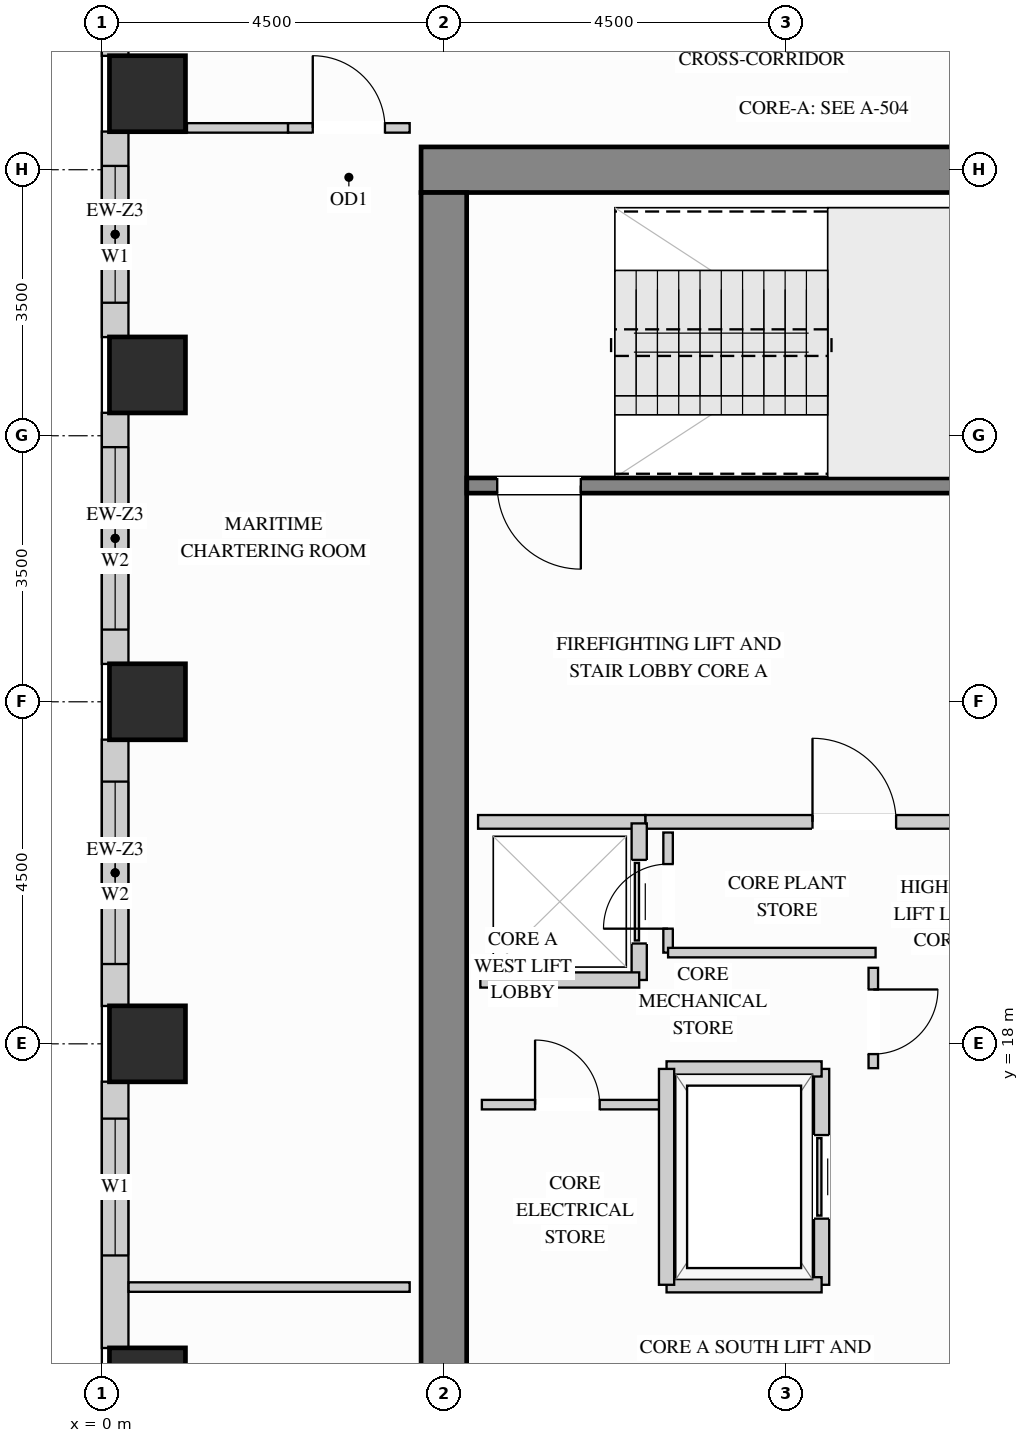
"""IFC4 building model, lengths in metres.
Left out: names, types, materials, properties, quantities, classifications, styles, units other than length and angle.
Written with IfcOpenShell. Run it as: python <this file> out.ifc"""

import sys

from ifc_helpers import new_model, si_unit, direction, frame, frame_2d, origin, origin_2d, place, context, subcontext, project, spatial, rectangle, extrude, source, transform, mapped, element, fill, save


model = new_model("IFC4")
c1 = context("Model", 3, precision=1e-05, world=origin(), true_north=direction((0.0, 1.0)))
c2 = subcontext(c1, "Body", "Model", "MODEL_VIEW")
j1 = project(units=[si_unit("LENGTHUNIT", "METRE"), si_unit("PLANEANGLEUNIT", "RADIAN")], contexts=[c1])
p1 = place(None, origin())
s1 = spatial("IfcSite", under=j1, at=p1, CompositionType="ELEMENT")
p2 = place(p1, origin())
s2 = spatial("IfcBuilding", under=s1, at=p2, CompositionType="ELEMENT")
p3 = place(p2, frame((0.0, 0.0, 164.7)))
s3 = spatial("IfcBuildingStorey", under=s2, at=p3, CompositionType="ELEMENT", Elevation=164.7)
m1 = source(origin(), c2, "Body", "SweptSolid", [
    extrude(rectangle(XDim=1.0, YDim=1.0, at=origin_2d()), origin(), (0.0, 0.0, 1.0), 3.4),
])
for number, where, z_axis, x_axis in (
    (1, (0.6, 13.5, 0.0), (0.0, 0.0, 1.0), (1.0, 0.0, 0.0)),
    (2, (0.6, 18.0, 0.0), (0.0, 0.0, 1.0), (1.0, 0.0, 0.0)),
    (3, (0.6, 22.5, 0.0), (0.0, 0.0, 1.0), (1.0, 0.0, 0.0)),
    (4, (0.6, 26.8, 0.0), (0.0, 0.0, 1.0), (1.0, 0.0, 0.0)),
    (5, (0.6, 30.5, 0.0), (0.0, 0.0, 1.0), (1.0, 0.0, 0.0)),
):
    element("IfcColumn", number, at=place(p3, frame(where, z_axis=z_axis, x_axis=x_axis)), inside=s3, PredefinedType="COLUMN", context=c2, shape_type="MappedRepresentation", body=[
        mapped(m1, transform((0.0, 0.0, 0.0), x_axis=(1.0, 0.0, 0.0), y_axis=(0.0, 1.0, 0.0), z_axis=(0.0, 0.0, 1.0))),
    ])
m2 = source(origin(), c2, "Body", "SweptSolid", [
    extrude(rectangle(XDim=10.6, YDim=0.6, at=frame_2d((5.3, 0.0))), origin(), (0.0, 0.0, 1.0), 3.4),
])
p4 = place(p3, frame((4.2, 29.5, 0.0), z_axis=(0.0, 0.0, 1.0), x_axis=(1.0, 0.0, 0.0)))
e6 = element("IfcWall", 6, at=p4, inside=s3, PredefinedType="SHEAR", context=c2, shape_type="MappedRepresentation", body=[
    mapped(m2, transform((0.0, 0.0, 0.0), x_axis=(1.0, 0.0, 0.0), y_axis=(0.0, 1.0, 0.0), z_axis=(0.0, 0.0, 1.0))),
])
m3 = source(origin(), c2, "Body", "SweptSolid", [
    extrude(rectangle(XDim=20.4, YDim=0.6, at=frame_2d((10.2, 0.0))), origin(), (0.0, 0.0, 1.0), 3.4),
])
p5 = place(p3, frame((4.5, 8.8, 0.0), z_axis=(0.0, 0.0, 1.0), x_axis=(0.0, 1.0, 0.0)))
e7 = element("IfcWall", 7, at=p5, inside=s3, PredefinedType="SHEAR", context=c2, shape_type="MappedRepresentation", body=[
    mapped(m3, transform((0.0, 0.0, 0.0), x_axis=(1.0, 0.0, 0.0), y_axis=(0.0, 1.0, 0.0), z_axis=(0.0, 0.0, 1.0))),
])
p6 = place(p3, frame((0.175, 34.502, 0.0), z_axis=(0.0, 0.0, 1.0), x_axis=(0.0, -1.0, 0.0)))
e8 = element("IfcWall", 8, at=p6, inside=s3, PredefinedType="SOLIDWALL", context=c2, shape_type="SweptSolid", body=[
    extrude(rectangle(XDim=3.504, YDim=0.35, at=frame_2d((1.752, 0.0))), origin(), (0.0, 0.0, 1.0), 2.612),
])
p7 = place(p6, frame((0.611, 0.0, 0.78)))
e9 = element("IfcOpeningElement", 9, at=p7, cuts=e8, PredefinedType="OPENING", context=c2, shape_type="SweptSolid", body=[
    extrude(rectangle(XDim=1.2, YDim=1.652, at=frame_2d((0.6, 0.826))), frame((0.0, 0.185, 0.0), z_axis=(0.0, -1.0, 0.0), x_axis=(1.0, 0.0, 0.0)), (0.0, 0.0, 1.0), 0.37),
])
p8 = place(p3, frame((0.175, 30.002, 0.0), z_axis=(0.0, 0.0, 1.0), x_axis=(0.0, -1.0, 0.0)))
e10 = element("IfcWall", 10, at=p8, inside=s3, PredefinedType="SOLIDWALL", context=c2, shape_type="SweptSolid", body=[
    extrude(rectangle(XDim=2.704, YDim=0.35, at=frame_2d((1.352, 0.0))), origin(), (0.0, 0.0, 1.0), 2.612),
])
p9 = place(p8, frame((0.452, 0.0, 0.78)))
e11 = element("IfcOpeningElement", 11, at=p9, cuts=e10, PredefinedType="OPENING", context=c2, shape_type="SweptSolid", body=[
    extrude(rectangle(XDim=1.8, YDim=1.652, at=frame_2d((0.9, 0.826))), frame((0.0, 0.185, 0.0), z_axis=(0.0, -1.0, 0.0), x_axis=(1.0, 0.0, 0.0)), (0.0, 0.0, 1.0), 0.37),
])
p10 = place(p3, frame((0.175, 26.302, 0.0), z_axis=(0.0, 0.0, 1.0), x_axis=(0.0, -1.0, 0.0)))
e12 = element("IfcWall", 12, at=p10, inside=s3, PredefinedType="SOLIDWALL", context=c2, shape_type="SweptSolid", body=[
    extrude(rectangle(XDim=3.304, YDim=0.35, at=frame_2d((1.652, 0.0))), origin(), (0.0, 0.0, 1.0), 2.612),
])
p11 = place(p10, frame((0.452, 0.0, 0.78)))
e13 = element("IfcOpeningElement", 13, at=p11, cuts=e12, PredefinedType="OPENING", context=c2, shape_type="SweptSolid", body=[
    extrude(rectangle(XDim=2.4, YDim=1.652, at=frame_2d((1.2, 0.826))), frame((0.0, 0.185, 0.0), z_axis=(0.0, -1.0, 0.0), x_axis=(1.0, 0.0, 0.0)), (0.0, 0.0, 1.0), 0.37),
])
p12 = place(p3, frame((0.175, 22.002, 0.0), z_axis=(0.0, 0.0, 1.0), x_axis=(0.0, -1.0, 0.0)))
e14 = element("IfcWall", 14, at=p12, inside=s3, PredefinedType="SOLIDWALL", context=c2, shape_type="SweptSolid", body=[
    extrude(rectangle(XDim=3.504, YDim=0.35, at=frame_2d((1.752, 0.0))), origin(), (0.0, 0.0, 1.0), 2.612),
])
p13 = place(p12, frame((0.552, 0.0, 0.78)))
e15 = element("IfcOpeningElement", 15, at=p13, cuts=e14, PredefinedType="OPENING", context=c2, shape_type="SweptSolid", body=[
    extrude(rectangle(XDim=2.4, YDim=1.652, at=frame_2d((1.2, 0.826))), frame((0.0, 0.185, 0.0), z_axis=(0.0, -1.0, 0.0), x_axis=(1.0, 0.0, 0.0)), (0.0, 0.0, 1.0), 0.37),
])
p14 = place(p3, frame((0.175, 17.502, 0.0), z_axis=(0.0, 0.0, 1.0), x_axis=(0.0, -1.0, 0.0)))
e16 = element("IfcWall", 16, at=p14, inside=s3, PredefinedType="SOLIDWALL", context=c2, shape_type="SweptSolid", body=[
    extrude(rectangle(XDim=3.504, YDim=0.35, at=frame_2d((1.752, 0.0))), origin(), (0.0, 0.0, 1.0), 2.612),
])
p15 = place(p14, frame((0.486, 0.0, 0.78)))
e17 = element("IfcOpeningElement", 17, at=p15, cuts=e16, PredefinedType="OPENING", context=c2, shape_type="SweptSolid", body=[
    extrude(rectangle(XDim=1.8, YDim=1.652, at=frame_2d((0.9, 0.826))), frame((0.0, 0.185, 0.0), z_axis=(0.0, -1.0, 0.0), x_axis=(1.0, 0.0, 0.0)), (0.0, 0.0, 1.0), 0.37),
])
p16 = place(p3, frame((7.15, 20.92, 0.0), z_axis=(0.0, 0.0, 1.0), x_axis=(1.0, 0.0, 0.0)))
e18 = element("IfcWall", 18, at=p16, inside=s3, PredefinedType="PARTITIONING", context=c2, shape_type="SweptSolid", body=[
    extrude(rectangle(XDim=4.68, YDim=0.18, at=frame_2d((2.34, 0.0))), origin(), (0.0, 0.0, 1.0), 3.385),
])
p17 = place(p16, frame((2.2, 0.0, 0.0)))
e19 = element("IfcOpeningElement", 19, at=p17, cuts=e18, PredefinedType="OPENING", context=c2, shape_type="SweptSolid", body=[
    extrude(rectangle(XDim=1.1, YDim=2.15, at=frame_2d((0.55, 1.075))), frame((0.0, 0.1, 0.0), z_axis=(0.0, -1.0, 0.0), x_axis=(1.0, 0.0, 0.0)), (0.0, 0.0, 1.0), 0.2),
])
m4 = source(origin(), c2, "Body", "SweptSolid", [
    extrude(rectangle(XDim=2.2, YDim=0.18, at=frame_2d((1.1, 0.0))), origin(), (0.0, 0.0, 1.0), 3.385),
])
p18 = place(p3, frame((4.95, 20.92, 0.0), z_axis=(0.0, 0.0, 1.0), x_axis=(1.0, 0.0, 0.0)))
e20 = element("IfcWall", 20, at=p18, inside=s3, PredefinedType="PARTITIONING", context=c2, shape_type="MappedRepresentation", body=[
    mapped(m4, transform((0.0, 0.0, 0.0), x_axis=(1.0, 0.0, 0.0), y_axis=(0.0, 1.0, 0.0), z_axis=(0.0, 0.0, 1.0))),
])
p19 = place(p3, frame((10.15, 17.68, 0.0), z_axis=(0.0, 0.0, 1.0), x_axis=(0.0, 1.0, 0.0)))
e21 = element("IfcWall", 21, at=p19, inside=s3, PredefinedType="PARTITIONING", context=c2, shape_type="SweptSolid", body=[
    extrude(rectangle(XDim=1.32, YDim=0.125, at=frame_2d((0.66, 0.0))), origin(), (0.0, 0.0, 1.0), 3.385),
])
p20 = place(p19, frame((0.185, 0.0, 0.0)))
e22 = element("IfcOpeningElement", 22, at=p20, cuts=e21, PredefinedType="OPENING", context=c2, shape_type="SweptSolid", body=[
    extrude(rectangle(XDim=0.85, YDim=2.1, at=frame_2d((0.425, 1.05))), frame((0.0, 0.073, 0.0), z_axis=(0.0, -1.0, 0.0), x_axis=(1.0, 0.0, 0.0)), (0.0, 0.0, 1.0), 0.145),
])
p21 = place(p3, frame((7.45, 19.2, 0.0), z_axis=(0.0, 0.0, 1.0), x_axis=(0.0, 1.0, 0.0)))
e23 = element("IfcWall", 23, at=p21, inside=s3, PredefinedType="PARTITIONING", context=c2, shape_type="SweptSolid", body=[
    extrude(rectangle(XDim=1.58, YDim=0.125, at=frame_2d((0.79, 0.0))), origin(), (0.0, 0.0, 1.0), 3.385),
])
p22 = place(p21, frame((0.315, 0.0, 0.0)))
e24 = element("IfcOpeningElement", 24, at=p22, cuts=e23, PredefinedType="OPENING", context=c2, shape_type="SweptSolid", body=[
    extrude(rectangle(XDim=0.85, YDim=2.1, at=frame_2d((0.425, 1.05))), frame((0.0, 0.073, 0.0), z_axis=(0.0, -1.0, 0.0), x_axis=(1.0, 0.0, 0.0)), (0.0, 0.0, 1.0), 0.145),
])
m5 = source(origin(), c2, "Body", "SweptSolid", [
    extrude(rectangle(XDim=2.73, YDim=0.125, at=frame_2d((1.365, 0.0))), origin(), (0.0, 0.0, 1.0), 3.385),
])
p23 = place(p3, frame((7.45, 19.2, 0.0), z_axis=(0.0, 0.0, 1.0), x_axis=(1.0, 0.0, 0.0)))
e25 = element("IfcWall", 25, at=p23, inside=s3, PredefinedType="PARTITIONING", context=c2, shape_type="MappedRepresentation", body=[
    mapped(m5, transform((0.0, 0.0, 0.0), x_axis=(1.0, 0.0, 0.0), y_axis=(0.0, 1.0, 0.0), z_axis=(0.0, 0.0, 1.0))),
])
p24 = place(p3, frame((5.0, 17.2, 0.0), z_axis=(0.0, 0.0, 1.0), x_axis=(1.0, 0.0, 0.0)))
e26 = element("IfcWall", 26, at=p24, inside=s3, PredefinedType="PARTITIONING", context=c2, shape_type="SweptSolid", body=[
    extrude(rectangle(XDim=2.4, YDim=0.125, at=frame_2d((1.2, 0.0))), origin(), (0.0, 0.0, 1.0), 3.385),
])
p25 = place(p24, frame((0.7, 0.0, 0.0)))
e27 = element("IfcOpeningElement", 27, at=p25, cuts=e26, PredefinedType="OPENING", context=c2, shape_type="SweptSolid", body=[
    extrude(rectangle(XDim=0.85, YDim=2.1, at=frame_2d((0.425, 1.05))), frame((0.0, 0.073, 0.0), z_axis=(0.0, -1.0, 0.0), x_axis=(1.0, 0.0, 0.0)), (0.0, 0.0, 1.0), 0.145),
])
m6 = source(origin(), c2, "Body", "SweptSolid", [
    extrude(rectangle(XDim=1.33, YDim=0.125, at=frame_2d((0.665, 0.0))), origin(), (0.0, 0.0, 1.0), 3.385),
])
p26 = place(p3, frame((1.12, 30.05, 0.0), z_axis=(0.0, 0.0, 1.0), x_axis=(1.0, 0.0, 0.0)))
e28 = element("IfcWall", 28, at=p26, inside=s3, PredefinedType="PARTITIONING", context=c2, shape_type="MappedRepresentation", body=[
    mapped(m6, transform((0.0, 0.0, 0.0), x_axis=(1.0, 0.0, 0.0), y_axis=(0.0, 1.0, 0.0), z_axis=(0.0, 0.0, 1.0))),
])
p27 = place(p3, frame((2.45, 30.05, 0.0), z_axis=(0.0, 0.0, 1.0), x_axis=(1.0, 0.0, 0.0)))
e29 = element("IfcWall", 29, at=p27, inside=s3, PredefinedType="PARTITIONING", context=c2, shape_type="SweptSolid", body=[
    extrude(rectangle(XDim=1.6, YDim=0.125, at=frame_2d((0.8, 0.0))), origin(), (0.0, 0.0, 1.0), 3.385),
])
p28 = place(p27, frame((0.325, 0.0, 0.0)))
e30 = element("IfcOpeningElement", 30, at=p28, cuts=e29, PredefinedType="OPENING", context=c2, shape_type="SweptSolid", body=[
    extrude(rectangle(XDim=0.95, YDim=2.15, at=frame_2d((0.475, 1.075))), frame((0.0, 0.073, 0.0), z_axis=(0.0, -1.0, 0.0), x_axis=(1.0, 0.0, 0.0)), (0.0, 0.0, 1.0), 0.145),
])
m7 = source(origin(), c2, "Body", "SweptSolid", [
    extrude(rectangle(XDim=3.698, YDim=0.125, at=frame_2d((1.849, 0.0))), origin(), (0.0, 0.0, 1.0), 3.385),
])
p29 = place(p3, frame((0.352, 14.8, 0.0), z_axis=(0.0, 0.0, 1.0), x_axis=(1.0, 0.0, 0.0)))
e31 = element("IfcWall", 31, at=p29, inside=s3, PredefinedType="PARTITIONING", context=c2, shape_type="MappedRepresentation", body=[
    mapped(m7, transform((0.0, 0.0, 0.0), x_axis=(1.0, 0.0, 0.0), y_axis=(0.0, 1.0, 0.0), z_axis=(0.0, 0.0, 1.0))),
])
p30 = place(p3, frame((7.07, 18.84, 0.0), z_axis=(0.0, 0.0, 1.0), x_axis=(0.0, 1.0, 0.0)))
e32 = element("IfcWall", 32, at=p30, inside=s3, PredefinedType="PARTITIONING", context=c2, shape_type="SweptSolid", body=[
    extrude(rectangle(XDim=2.06, YDim=0.2, at=frame_2d((1.03, 0.0))), origin(), (0.0, 0.0, 1.0), 3.385),
])
p31 = place(p30, frame((0.48, 0.0, 0.0)))
e33 = element("IfcOpeningElement", 33, at=p31, cuts=e32, PredefinedType="OPENING", context=c2, shape_type="SweptSolid", body=[
    extrude(rectangle(XDim=1.1, YDim=2.2, at=frame_2d((0.55, 1.1))), frame((0.0, 0.11, 0.0), z_axis=(0.0, -1.0, 0.0), x_axis=(1.0, 0.0, 0.0)), (0.0, 0.0, 1.0), 0.22),
])
m8 = source(origin(), c2, "Body", "SweptSolid", [
    extrude(rectangle(XDim=2.09, YDim=0.2, at=frame_2d((1.045, 0.0))), origin(), (0.0, 0.0, 1.0), 3.385),
])
p32 = place(p3, frame((4.98, 18.84, 0.0), z_axis=(0.0, 0.0, 1.0), x_axis=(1.0, 0.0, 0.0)))
e34 = element("IfcWall", 34, at=p32, inside=s3, PredefinedType="PARTITIONING", context=c2, shape_type="MappedRepresentation", body=[
    mapped(m8, transform((0.0, 0.0, 0.0), x_axis=(1.0, 0.0, 0.0), y_axis=(0.0, 1.0, 0.0), z_axis=(0.0, 0.0, 1.0))),
])
p33 = place(p3, frame((9.47, 14.83, 0.0), z_axis=(0.0, 0.0, 1.0), x_axis=(0.0, 1.0, 0.0)))
e35 = element("IfcWall", 35, at=p33, inside=s3, PredefinedType="PARTITIONING", context=c2, shape_type="SweptSolid", body=[
    extrude(rectangle(XDim=2.84, YDim=0.2, at=frame_2d((1.42, 0.0))), origin(), (0.0, 0.0, 1.0), 3.385),
])
p34 = place(p33, frame((0.87, 0.0, 0.0)))
e36 = element("IfcOpeningElement", 36, at=p34, cuts=e35, PredefinedType="OPENING", context=c2, shape_type="SweptSolid", body=[
    extrude(rectangle(XDim=1.1, YDim=2.2, at=frame_2d((0.55, 1.1))), frame((0.0, 0.11, 0.0), z_axis=(0.0, -1.0, 0.0), x_axis=(1.0, 0.0, 0.0)), (0.0, 0.0, 1.0), 0.22),
])
m9 = source(origin(), c2, "Body", "SweptSolid", [
    extrude(rectangle(XDim=2.04, YDim=0.2, at=frame_2d((1.02, 0.0))), origin(), (0.0, 0.0, 1.0), 3.385),
])
for number, where, z_axis, x_axis in (
    (37, (7.43, 17.67, 0.0), (0.0, 0.0, 1.0), (1.0, 0.0, 0.0)),
    (38, (7.43, 14.83, 0.0), (0.0, 0.0, 1.0), (1.0, 0.0, 0.0)),
):
    element("IfcWall", number, at=place(p3, frame(where, z_axis=z_axis, x_axis=x_axis)), inside=s3, PredefinedType="PARTITIONING", context=c2, shape_type="MappedRepresentation", body=[
        mapped(m9, transform((0.0, 0.0, 0.0), x_axis=(1.0, 0.0, 0.0), y_axis=(0.0, 1.0, 0.0), z_axis=(0.0, 0.0, 1.0))),
    ])
m10 = source(origin(), c2, "Body", "SweptSolid", [
    extrude(rectangle(XDim=2.84, YDim=0.2, at=frame_2d((1.42, 0.0))), origin(), (0.0, 0.0, 1.0), 3.385),
])
p35 = place(p3, frame((7.43, 14.83, 0.0), z_axis=(0.0, 0.0, 1.0), x_axis=(0.0, 1.0, 0.0)))
e39 = element("IfcWall", 39, at=p35, inside=s3, PredefinedType="PARTITIONING", context=c2, shape_type="MappedRepresentation", body=[
    mapped(m10, transform((0.0, 0.0, 0.0), x_axis=(1.0, 0.0, 0.0), y_axis=(0.0, 1.0, 0.0), z_axis=(0.0, 0.0, 1.0))),
])
p36 = place(p3, frame((4.802, 25.345, 0.0), z_axis=(0.0, 0.0, 1.0), x_axis=(1.0, 0.0, 0.0)))
e40 = element("IfcWall", 40, at=p36, inside=s3, PredefinedType="SHEAR", context=c2, shape_type="SweptSolid", body=[
    extrude(rectangle(XDim=7.603, YDim=0.2, at=frame_2d((3.802, 0.0))), origin(), (0.0, 0.0, 1.0), 3.4),
])
p37 = place(p36, frame((0.4, 0.0, 0.0)))
e41 = element("IfcOpeningElement", 41, at=p37, cuts=e40, PredefinedType="OPENING", context=c2, shape_type="SweptSolid", body=[
    extrude(rectangle(XDim=1.1, YDim=2.15, at=frame_2d((0.55, 1.075))), frame((0.0, 0.11, 0.0), z_axis=(0.0, -1.0, 0.0), x_axis=(1.0, 0.0, 0.0)), (0.0, 0.0, 1.0), 0.22),
])
m11 = source(origin(), c2, "Body", "SweptSolid", [
    extrude(rectangle(XDim=1.1, YDim=2.15, at=frame_2d((0.55, 1.075))), frame((0.0, 0.025, 0.0), z_axis=(0.0, -1.0, 0.0), x_axis=(1.0, 0.0, 0.0)), (0.0, 0.0, 1.0), 0.05),
])
p38 = place(p17, origin())
e42 = element("IfcDoor", 42, at=p38, inside=s3, OperationType="SINGLE_SWING_LEFT", PredefinedType="DOOR", context=c2, shape_type="MappedRepresentation", body=[
    mapped(m11, transform((0.0, 0.0, 0.0), x_axis=(1.0, 0.0, 0.0), y_axis=(0.0, 1.0, 0.0), z_axis=(0.0, 0.0, 1.0))),
])
fill(e19, e42)
m12 = source(origin(), c2, "Body", "SweptSolid", [
    extrude(rectangle(XDim=1.1, YDim=2.2, at=frame_2d((0.55, 1.1))), frame((0.0, 0.025, 0.0), z_axis=(0.0, -1.0, 0.0), x_axis=(1.0, 0.0, 0.0)), (0.0, 0.0, 1.0), 0.05),
])
p39 = place(p31, origin())
e43 = element("IfcDoor", 43, at=p39, inside=s3, OperationType="SLIDING_TO_LEFT", PredefinedType="DOOR", context=c2, shape_type="MappedRepresentation", body=[
    mapped(m12, transform((0.0, 0.0, 0.0), x_axis=(1.0, 0.0, 0.0), y_axis=(0.0, 1.0, 0.0), z_axis=(0.0, 0.0, 1.0))),
])
fill(e33, e43)
p40 = place(p34, origin())
e44 = element("IfcDoor", 44, at=p40, inside=s3, OperationType="SLIDING_TO_LEFT", PredefinedType="DOOR", context=c2, shape_type="MappedRepresentation", body=[
    mapped(m12, transform((0.0, 0.0, 0.0), x_axis=(1.0, 0.0, 0.0), y_axis=(0.0, 1.0, 0.0), z_axis=(0.0, 0.0, 1.0))),
])
fill(e36, e44)
m13 = source(origin(), c2, "Body", "SweptSolid", [
    extrude(rectangle(XDim=0.95, YDim=2.15, at=frame_2d((0.475, 1.075))), frame((0.0, 0.025, 0.0), z_axis=(0.0, -1.0, 0.0), x_axis=(1.0, 0.0, 0.0)), (0.0, 0.0, 1.0), 0.05),
])
p41 = place(p28, origin())
e45 = element("IfcDoor", 45, at=p41, inside=s3, OperationType="SINGLE_SWING_LEFT", PredefinedType="DOOR", context=c2, shape_type="MappedRepresentation", body=[
    mapped(m13, transform((0.0, 0.0, 0.0), x_axis=(1.0, 0.0, 0.0), y_axis=(0.0, 1.0, 0.0), z_axis=(0.0, 0.0, 1.0))),
])
fill(e30, e45)
m14 = source(origin(), c2, "Body", "SweptSolid", [
    extrude(rectangle(XDim=0.85, YDim=2.1, at=frame_2d((0.425, 1.05))), frame((0.0, 0.025, 0.0), z_axis=(0.0, -1.0, 0.0), x_axis=(1.0, 0.0, 0.0)), (0.0, 0.0, 1.0), 0.05),
])
p42 = place(p20, origin())
e46 = element("IfcDoor", 46, at=p42, inside=s3, OperationType="SINGLE_SWING_RIGHT", PredefinedType="DOOR", context=c2, shape_type="MappedRepresentation", body=[
    mapped(m14, transform((0.0, 0.0, 0.0), x_axis=(1.0, 0.0, 0.0), y_axis=(0.0, 1.0, 0.0), z_axis=(0.0, 0.0, 1.0))),
])
fill(e22, e46)
p43 = place(p25, origin())
e47 = element("IfcDoor", 47, at=p43, inside=s3, OperationType="SINGLE_SWING_LEFT", PredefinedType="DOOR", context=c2, shape_type="MappedRepresentation", body=[
    mapped(m14, transform((0.0, 0.0, 0.0), x_axis=(1.0, 0.0, 0.0), y_axis=(0.0, 1.0, 0.0), z_axis=(0.0, 0.0, 1.0))),
])
fill(e27, e47)
p44 = place(p22, origin())
e48 = element("IfcDoor", 48, at=p44, inside=s3, OperationType="SINGLE_SWING_LEFT", PredefinedType="DOOR", context=c2, shape_type="MappedRepresentation", body=[
    mapped(m14, transform((0.0, 0.0, 0.0), x_axis=(1.0, 0.0, 0.0), y_axis=(0.0, 1.0, 0.0), z_axis=(0.0, 0.0, 1.0))),
])
fill(e24, e48)
m15 = source(origin(), c2, "Body", "SweptSolid", [
    extrude(rectangle(XDim=1.1, YDim=2.15, at=frame_2d((0.55, 1.075))), frame((0.0, 0.025, 0.0), z_axis=(0.0, -1.0, 0.0), x_axis=(1.0, 0.0, 0.0)), (0.0, 0.0, 1.0), 0.05),
])
p45 = place(p37, origin())
e49 = element("IfcDoor", 49, at=p45, inside=s3, OperationType="SINGLE_SWING_RIGHT", PredefinedType="DOOR", context=c2, shape_type="MappedRepresentation", body=[
    mapped(m15, transform((0.0, 0.0, 0.0), x_axis=(1.0, 0.0, 0.0), y_axis=(0.0, 1.0, 0.0), z_axis=(0.0, 0.0, 1.0))),
])
fill(e41, e49)
m16 = source(origin(), c2, "Body", "SweptSolid", [
    extrude(rectangle(XDim=1.8, YDim=1.652, at=frame_2d((0.9, 0.826))), frame((0.0, 0.03, 0.0), z_axis=(0.0, -1.0, 0.0), x_axis=(1.0, 0.0, 0.0)), (0.0, 0.0, 1.0), 0.06),
])
p46 = place(p9, origin())
e50 = element("IfcWindow", 50, at=p46, inside=s3, PartitioningType="SINGLE_PANEL", PredefinedType="WINDOW", context=c2, shape_type="MappedRepresentation", body=[
    mapped(m16, transform((0.0, 0.0, 0.0), x_axis=(1.0, 0.0, 0.0), y_axis=(0.0, 1.0, 0.0), z_axis=(0.0, 0.0, 1.0))),
])
fill(e11, e50)
p47 = place(p15, origin())
e51 = element("IfcWindow", 51, at=p47, inside=s3, PartitioningType="SINGLE_PANEL", PredefinedType="WINDOW", context=c2, shape_type="MappedRepresentation", body=[
    mapped(m16, transform((0.0, 0.0, 0.0), x_axis=(1.0, 0.0, 0.0), y_axis=(0.0, 1.0, 0.0), z_axis=(0.0, 0.0, 1.0))),
])
fill(e17, e51)
m17 = source(origin(), c2, "Body", "SweptSolid", [
    extrude(rectangle(XDim=2.4, YDim=1.652, at=frame_2d((1.2, 0.826))), frame((0.0, 0.03, 0.0), z_axis=(0.0, -1.0, 0.0), x_axis=(1.0, 0.0, 0.0)), (0.0, 0.0, 1.0), 0.06),
])
p48 = place(p11, origin())
e52 = element("IfcWindow", 52, at=p48, inside=s3, PartitioningType="SINGLE_PANEL", PredefinedType="WINDOW", context=c2, shape_type="MappedRepresentation", body=[
    mapped(m17, transform((0.0, 0.0, 0.0), x_axis=(1.0, 0.0, 0.0), y_axis=(0.0, 1.0, 0.0), z_axis=(0.0, 0.0, 1.0))),
])
fill(e13, e52)
p49 = place(p13, origin())
e53 = element("IfcWindow", 53, at=p49, inside=s3, PartitioningType="SINGLE_PANEL", PredefinedType="WINDOW", context=c2, shape_type="MappedRepresentation", body=[
    mapped(m17, transform((0.0, 0.0, 0.0), x_axis=(1.0, 0.0, 0.0), y_axis=(0.0, 1.0, 0.0), z_axis=(0.0, 0.0, 1.0))),
])
fill(e15, e53)
save(model, sys.argv[1])
